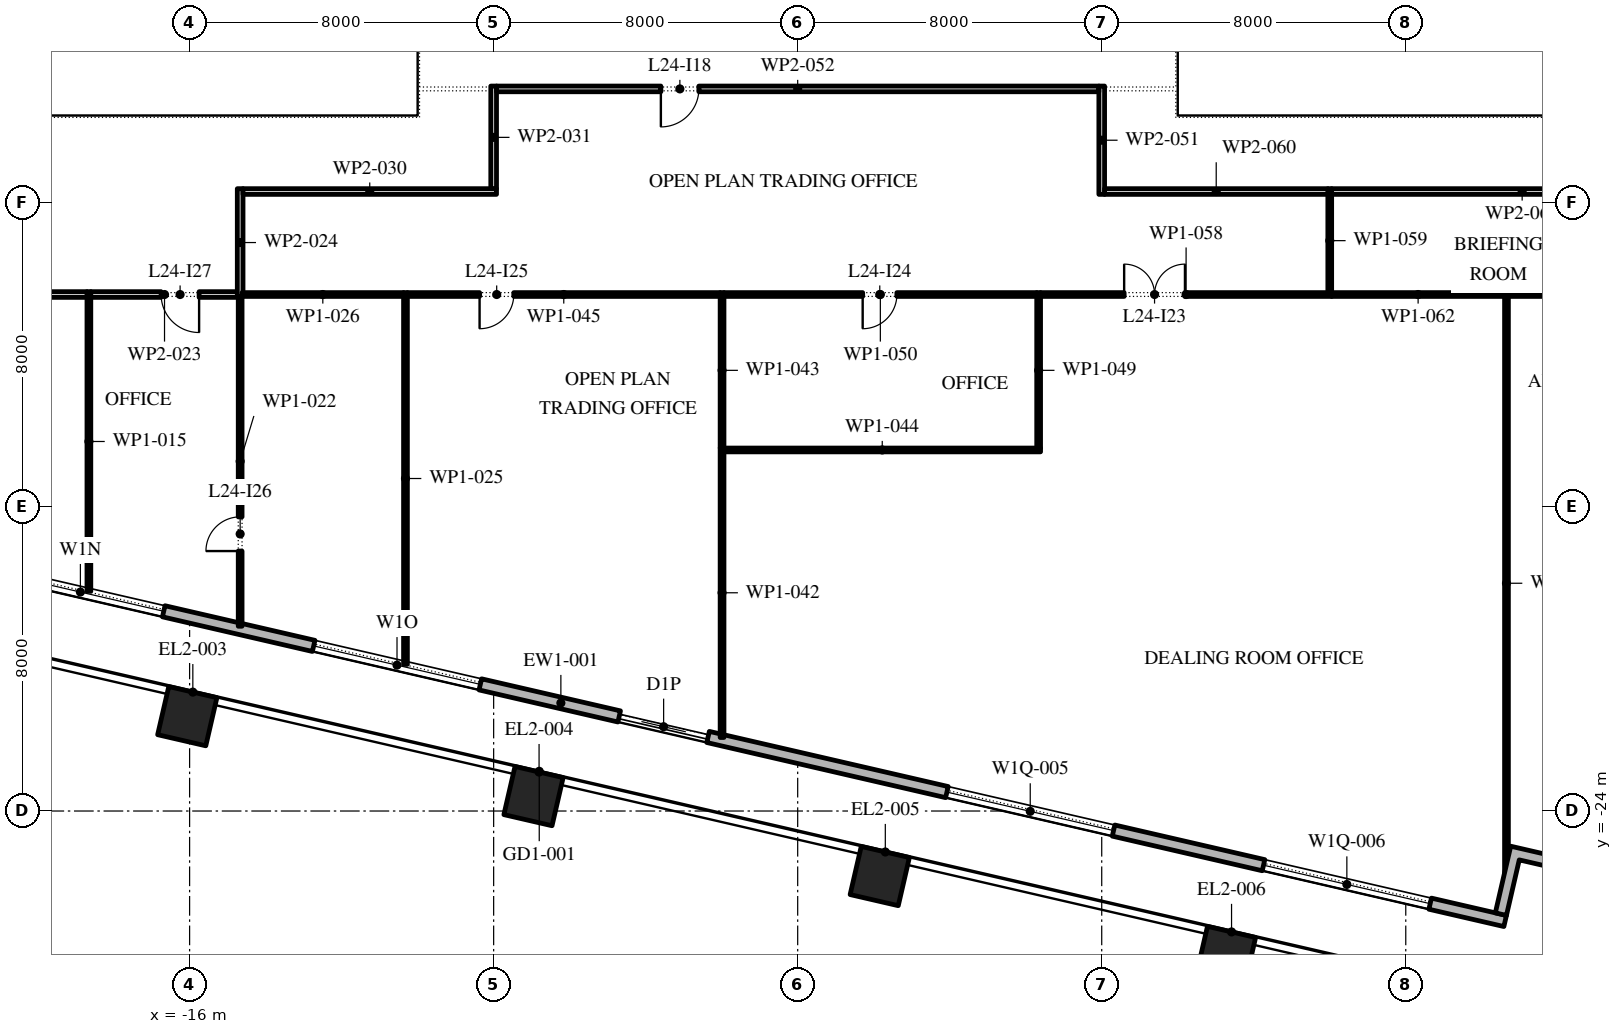
"""IFC4 building model, lengths in metres.
Left out: names, types, materials, properties, quantities, classifications, styles, units other than length and angle.
Written with IfcOpenShell. Run it as: python <this file> out.ifc"""

import sys

from ifc_helpers import new_model, si_unit, direction, frame, frame_2d, origin, origin_2d, place, context, subcontext, project, spatial, polyline, rectangle, outline, extrude, element, fill, save


model = new_model("IFC4")
c1 = context("Model", 3, precision=1e-05, world=origin(), true_north=direction((0.0, 1.0)))
c2 = subcontext(c1, "Body", "Model", "MODEL_VIEW")
j1 = project(units=[si_unit("LENGTHUNIT", "METRE"), si_unit("PLANEANGLEUNIT", "RADIAN")], contexts=[c1])
p1 = place(None, origin())
s1 = spatial("IfcSite", under=j1, at=p1, CompositionType="ELEMENT")
p2 = place(p1, origin())
s2 = spatial("IfcBuilding", under=s1, at=p2, CompositionType="ELEMENT")
p3 = place(p2, frame((0.0, 0.0, 114.0)))
s3 = spatial("IfcBuildingStorey", under=s2, at=p3, CompositionType="ELEMENT", Elevation=114.0)
for number, where, z_axis, x_axis in (
    (1, (-16.061, -21.505, 0.0), (0.0, 0.0, 1.0), (0.974, -0.225, 0.0)),
    (2, (-6.951, -23.608, 0.0), (0.0, 0.0, 1.0), (0.974, -0.225, 0.0)),
    (3, (2.159, -25.711, 0.0), (0.0, 0.0, 1.0), (0.974, -0.225, 0.0)),
    (4, (11.27, -27.815, 0.0), (0.0, 0.0, 1.0), (0.974, -0.225, 0.0)),
):
    element("IfcColumn", number, at=place(p3, frame(where, z_axis=z_axis, x_axis=x_axis)), inside=s3, PredefinedType="COLUMN", context=c2, shape_type="SweptSolid", body=[
        extrude(rectangle(XDim=1.3, YDim=1.3, at=origin_2d()), origin(), (0.0, 0.0, 1.0), 4.2),
    ])
p4 = place(p3, frame((-31.078, -15.421, 0.0), z_axis=(0.0, 0.0, 1.0), x_axis=(0.974370456532, -0.224949357493, 0.0)))
e5 = element("IfcWall", 5, at=p4, inside=s3, PredefinedType="STANDARD", context=c2, shape_type="SweptSolid", body=[
    extrude(rectangle(XDim=51.0, YDim=0.3, at=frame_2d((25.5, 0.0))), origin(), (0.0, 0.0, 1.0), 4.0),
])
p5 = place(p4, frame((1.875, 0.0, 0.45)))
e6 = element("IfcOpeningElement", 6, at=p5, cuts=e5, PredefinedType="OPENING", context=c2, shape_type="SweptSolid", body=[
    extrude(rectangle(XDim=4.5, YDim=2.65, at=frame_2d((2.25, 1.325))), frame((0.0, 0.16, 0.0), z_axis=(0.0, -1.0, 0.0), x_axis=(1.0, 0.0, 0.0)), (0.0, 0.0, 1.0), 0.32),
])
p6 = place(p4, frame((10.275, 0.0, 0.45)))
e7 = element("IfcOpeningElement", 7, at=p6, cuts=e5, PredefinedType="OPENING", context=c2, shape_type="SweptSolid", body=[
    extrude(rectangle(XDim=4.5, YDim=2.525, at=frame_2d((2.25, 1.262))), frame((0.0, 0.16, 0.0), z_axis=(0.0, -1.0, 0.0), x_axis=(1.0, 0.0, 0.0)), (0.0, 0.0, 1.0), 0.32),
])
p7 = place(p4, frame((18.825, 0.0, 0.45)))
e8 = element("IfcOpeningElement", 8, at=p7, cuts=e5, PredefinedType="OPENING", context=c2, shape_type="SweptSolid", body=[
    extrude(rectangle(XDim=4.5, YDim=2.5, at=frame_2d((2.25, 1.25))), frame((0.0, 0.16, 0.0), z_axis=(0.0, -1.0, 0.0), x_axis=(1.0, 0.0, 0.0)), (0.0, 0.0, 1.0), 0.32),
])
p8 = place(p4, frame((27.075, 0.0, 0.0)))
e9 = element("IfcOpeningElement", 9, at=p8, cuts=e5, PredefinedType="OPENING", context=c2, shape_type="SweptSolid", body=[
    extrude(rectangle(XDim=2.4, YDim=2.9, at=frame_2d((1.2, 1.45))), frame((0.0, 0.16, 0.0), z_axis=(0.0, -1.0, 0.0), x_axis=(1.0, 0.0, 0.0)), (0.0, 0.0, 1.0), 0.32),
])
p9 = place(p4, frame((35.925, 0.0, 0.45)))
e10 = element("IfcOpeningElement", 10, at=p9, cuts=e5, PredefinedType="OPENING", context=c2, shape_type="SweptSolid", body=[
    extrude(rectangle(XDim=4.5, YDim=2.45, at=frame_2d((2.25, 1.225))), frame((0.0, 0.16, 0.0), z_axis=(0.0, -1.0, 0.0), x_axis=(1.0, 0.0, 0.0)), (0.0, 0.0, 1.0), 0.32),
])
p10 = place(p4, frame((44.475, 0.0, 0.45)))
e11 = element("IfcOpeningElement", 11, at=p10, cuts=e5, PredefinedType="OPENING", context=c2, shape_type="SweptSolid", body=[
    extrude(rectangle(XDim=4.5, YDim=2.45, at=frame_2d((2.25, 1.225))), frame((0.0, 0.16, 0.0), z_axis=(0.0, -1.0, 0.0), x_axis=(1.0, 0.0, 0.0)), (0.0, 0.0, 1.0), 0.32),
])
p11 = place(p3, origin())
e12 = element("IfcWall", 12, at=p11, inside=s3, PredefinedType="STANDARD", context=c2, shape_type="SweptSolid", body=[
    extrude(outline(polyline([(20.515, -25.331), (20.92, -23.577), (22.967, -24.049), (22.899, -24.342), (21.145, -23.937), (20.74, -25.691), (18.986, -25.286), (18.649, -26.747), (18.357, -26.68), (18.762, -24.926), (20.515, -25.331)])), origin(), (0.0, 0.0, 1.0), 4.0),
])
p12 = place(p3, frame((-18.65, -18.219, 0.0), z_axis=(0.0, 0.0, 1.0), x_axis=(0.0, 1.0, 0.0)))
e13 = element("IfcWall", 13, at=p12, inside=s3, PredefinedType="PARTITIONING", context=c2, shape_type="SweptSolid", body=[
    extrude(rectangle(XDim=7.884, YDim=0.1, at=frame_2d((3.942, 0.0))), origin(), (0.0, 0.0, 1.0), 4.0),
])
p13 = place(p3, frame((-18.7, -10.41, 0.0), z_axis=(0.0, 0.0, 1.0), x_axis=(-1.0, 0.0, 0.0)))
e14 = element("IfcWall", 14, at=p13, inside=s3, PredefinedType="PARTITIONING", context=c2, shape_type="SweptSolid", body=[
    extrude(rectangle(XDim=3.8, YDim=0.15, at=frame_2d((1.9, 0.0))), origin(), (0.0, 0.0, 1.0), 4.0),
])
p14 = place(p13, frame((1.4, 0.0, 0.0)))
e15 = element("IfcOpeningElement", 15, at=p14, cuts=e14, PredefinedType="OPENING", context=c2, shape_type="SweptSolid", body=[
    extrude(rectangle(XDim=1.0, YDim=2.1, at=frame_2d((0.5, 1.05))), frame((0.0, 0.085, 0.0), z_axis=(0.0, -1.0, 0.0), x_axis=(1.0, 0.0, 0.0)), (0.0, 0.0, 1.0), 0.17),
])
p15 = place(p3, frame((-14.67, -19.138, 0.0), z_axis=(0.0, 0.0, 1.0), x_axis=(0.0, 1.0, 0.0)))
e16 = element("IfcWall", 16, at=p15, inside=s3, PredefinedType="PARTITIONING", context=c2, shape_type="SweptSolid", body=[
    extrude(rectangle(XDim=8.678, YDim=0.1, at=frame_2d((4.339, 0.0))), origin(), (0.0, 0.0, 1.0), 4.0),
])
p16 = place(p15, frame((1.978, 0.0, 0.0)))
e17 = element("IfcOpeningElement", 17, at=p16, cuts=e16, PredefinedType="OPENING", context=c2, shape_type="SweptSolid", body=[
    extrude(rectangle(XDim=0.9, YDim=2.1, at=frame_2d((0.45, 1.05))), frame((0.0, 0.06, 0.0), z_axis=(0.0, -1.0, 0.0), x_axis=(1.0, 0.0, 0.0)), (0.0, 0.0, 1.0), 0.12),
])
p17 = place(p3, frame((-14.72, -10.41, 0.0), z_axis=(0.0, 0.0, 1.0), x_axis=(-1.0, 0.0, 0.0)))
e18 = element("IfcWall", 18, at=p17, inside=s3, PredefinedType="PARTITIONING", context=c2, shape_type="SweptSolid", body=[
    extrude(rectangle(XDim=3.88, YDim=0.15, at=frame_2d((1.94, 0.0))), origin(), (0.0, 0.0, 1.0), 4.0),
])
p18 = place(p17, frame((1.03, 0.0, 0.0)))
e19 = element("IfcOpeningElement", 19, at=p18, cuts=e18, PredefinedType="OPENING", context=c2, shape_type="SweptSolid", body=[
    extrude(rectangle(XDim=1.0, YDim=2.1, at=frame_2d((0.5, 1.05))), frame((0.0, 0.085, 0.0), z_axis=(0.0, -1.0, 0.0), x_axis=(1.0, 0.0, 0.0)), (0.0, 0.0, 1.0), 0.17),
])
p19 = place(p3, frame((-14.67, -7.625, 0.0), z_axis=(0.0, 0.0, 1.0), x_axis=(0.0, -1.0, 0.0)))
e20 = element("IfcWall", 20, at=p19, inside=s3, PredefinedType="PARTITIONING", context=c2, shape_type="SweptSolid", body=[
    extrude(rectangle(XDim=2.835, YDim=0.15, at=frame_2d((1.417, 0.0))), origin(), (0.0, 0.0, 1.0), 4.0),
])
p20 = place(p3, frame((-10.32, -20.142, 0.0), z_axis=(0.0, 0.0, 1.0), x_axis=(0.0, 1.0, 0.0)))
e21 = element("IfcWall", 21, at=p20, inside=s3, PredefinedType="PARTITIONING", context=c2, shape_type="SweptSolid", body=[
    extrude(rectangle(XDim=9.782, YDim=0.1, at=frame_2d((4.891, 0.0))), origin(), (0.0, 0.0, 1.0), 4.0),
])
p21 = place(p3, frame((-10.37, -10.41, 0.0), z_axis=(0.0, 0.0, 1.0), x_axis=(-1.0, 0.0, 0.0)))
e22 = element("IfcWall", 22, at=p21, inside=s3, PredefinedType="PARTITIONING", context=c2, shape_type="SweptSolid", body=[
    extrude(rectangle(XDim=4.25, YDim=0.1, at=frame_2d((2.125, 0.0))), origin(), (0.0, 0.0, 1.0), 4.0),
])
p22 = place(p3, frame((-7.925, -7.7, 0.0), z_axis=(0.0, 0.0, 1.0), x_axis=(-1.0, 0.0, 0.0)))
e23 = element("IfcWall", 23, at=p22, inside=s3, PredefinedType="PARTITIONING", context=c2, shape_type="SweptSolid", body=[
    extrude(rectangle(XDim=6.67, YDim=0.15, at=frame_2d((3.335, 0.0))), origin(), (0.0, 0.0, 1.0), 4.0),
])
p23 = place(p3, frame((-8.0, -4.925, 0.0), z_axis=(0.0, 0.0, 1.0), x_axis=(0.0, -1.0, 0.0)))
e24 = element("IfcWall", 24, at=p23, inside=s3, PredefinedType="PARTITIONING", context=c2, shape_type="SweptSolid", body=[
    extrude(rectangle(XDim=2.7, YDim=0.15, at=frame_2d((1.35, 0.0))), origin(), (0.0, 0.0, 1.0), 4.0),
])
p24 = place(p3, frame((-1.99, -22.065, 0.0), z_axis=(0.0, 0.0, 1.0), x_axis=(0.0, 1.0, 0.0)))
e25 = element("IfcWall", 25, at=p24, inside=s3, PredefinedType="PARTITIONING", context=c2, shape_type="SweptSolid", body=[
    extrude(rectangle(XDim=7.615, YDim=0.1, at=frame_2d((3.808, 0.0))), origin(), (0.0, 0.0, 1.0), 4.0),
])
p25 = place(p3, frame((-1.99, -14.45, 0.0), z_axis=(0.0, 0.0, 1.0), x_axis=(0.0, 1.0, 0.0)))
e26 = element("IfcWall", 26, at=p25, inside=s3, PredefinedType="PARTITIONING", context=c2, shape_type="SweptSolid", body=[
    extrude(rectangle(XDim=4.09, YDim=0.1, at=frame_2d((2.045, 0.0))), origin(), (0.0, 0.0, 1.0), 4.0),
])
p26 = place(p3, frame((-1.94, -14.5, 0.0), z_axis=(0.0, 0.0, 1.0), x_axis=(1.0, 0.0, 0.0)))
e27 = element("IfcWall", 27, at=p26, inside=s3, PredefinedType="PARTITIONING", context=c2, shape_type="SweptSolid", body=[
    extrude(rectangle(XDim=8.33, YDim=0.1, at=frame_2d((4.165, 0.0))), origin(), (0.0, 0.0, 1.0), 4.0),
])
p27 = place(p3, frame((-2.04, -10.41, 0.0), z_axis=(0.0, 0.0, 1.0), x_axis=(-1.0, 0.0, 0.0)))
e28 = element("IfcWall", 28, at=p27, inside=s3, PredefinedType="PARTITIONING", context=c2, shape_type="SweptSolid", body=[
    extrude(rectangle(XDim=8.23, YDim=0.1, at=frame_2d((4.115, 0.0))), origin(), (0.0, 0.0, 1.0), 4.0),
])
p28 = place(p27, frame((5.43, 0.0, 0.0)))
e29 = element("IfcOpeningElement", 29, at=p28, cuts=e28, PredefinedType="OPENING", context=c2, shape_type="SweptSolid", body=[
    extrude(rectangle(XDim=0.9, YDim=2.1, at=frame_2d((0.45, 1.05))), frame((0.0, 0.06, 0.0), z_axis=(0.0, -1.0, 0.0), x_axis=(1.0, 0.0, 0.0)), (0.0, 0.0, 1.0), 0.12),
])
p29 = place(p3, frame((6.34, -14.45, 0.0), z_axis=(0.0, 0.0, 1.0), x_axis=(0.0, 1.0, 0.0)))
e30 = element("IfcWall", 30, at=p29, inside=s3, PredefinedType="PARTITIONING", context=c2, shape_type="SweptSolid", body=[
    extrude(rectangle(XDim=4.09, YDim=0.1, at=frame_2d((2.045, 0.0))), origin(), (0.0, 0.0, 1.0), 4.0),
])
p30 = place(p3, frame((6.29, -10.41, 0.0), z_axis=(0.0, 0.0, 1.0), x_axis=(-1.0, 0.0, 0.0)))
e31 = element("IfcWall", 31, at=p30, inside=s3, PredefinedType="PARTITIONING", context=c2, shape_type="SweptSolid", body=[
    extrude(rectangle(XDim=8.23, YDim=0.1, at=frame_2d((4.115, 0.0))), origin(), (0.0, 0.0, 1.0), 4.0),
])
p31 = place(p30, frame((3.68, 0.0, 0.0)))
e32 = element("IfcOpeningElement", 32, at=p31, cuts=e31, PredefinedType="OPENING", context=c2, shape_type="SweptSolid", body=[
    extrude(rectangle(XDim=0.9, YDim=2.1, at=frame_2d((0.45, 1.05))), frame((0.0, 0.06, 0.0), z_axis=(0.0, -1.0, 0.0), x_axis=(1.0, 0.0, 0.0)), (0.0, 0.0, 1.0), 0.12),
])
p32 = place(p3, frame((8.0, -7.775, 0.0), z_axis=(0.0, 0.0, 1.0), x_axis=(0.0, 1.0, 0.0)))
e33 = element("IfcWall", 33, at=p32, inside=s3, PredefinedType="PARTITIONING", context=c2, shape_type="SweptSolid", body=[
    extrude(rectangle(XDim=2.85, YDim=0.15, at=frame_2d((1.425, 0.0))), origin(), (0.0, 0.0, 1.0), 4.0),
])
p33 = place(p3, frame((7.925, -5.0, 0.0), z_axis=(0.0, 0.0, 1.0), x_axis=(-1.0, 0.0, 0.0)))
e34 = element("IfcWall", 34, at=p33, inside=s3, PredefinedType="PARTITIONING", context=c2, shape_type="SweptSolid", body=[
    extrude(rectangle(XDim=15.85, YDim=0.15, at=frame_2d((7.925, 0.0))), origin(), (0.0, 0.0, 1.0), 4.0),
])
p34 = place(p33, frame((10.525, 0.0, 0.0)))
e35 = element("IfcOpeningElement", 35, at=p34, cuts=e34, PredefinedType="OPENING", context=c2, shape_type="SweptSolid", body=[
    extrude(rectangle(XDim=1.0, YDim=2.1, at=frame_2d((0.5, 1.05))), frame((0.0, 0.085, 0.0), z_axis=(0.0, -1.0, 0.0), x_axis=(1.0, 0.0, 0.0)), (0.0, 0.0, 1.0), 0.17),
])
p35 = place(p3, frame((14.05, -10.41, 0.0), z_axis=(0.0, 0.0, 1.0), x_axis=(-1.0, 0.0, 0.0)))
e36 = element("IfcWall", 36, at=p35, inside=s3, PredefinedType="PARTITIONING", context=c2, shape_type="SweptSolid", body=[
    extrude(rectangle(XDim=7.66, YDim=0.1, at=frame_2d((3.83, 0.0))), origin(), (0.0, 0.0, 1.0), 4.0),
])
p36 = place(p35, frame((3.86, 0.0, 0.0)))
e37 = element("IfcOpeningElement", 37, at=p36, cuts=e36, PredefinedType="OPENING", context=c2, shape_type="SweptSolid", body=[
    extrude(rectangle(XDim=1.6, YDim=2.1, at=frame_2d((0.8, 1.05))), frame((0.0, 0.06, 0.0), z_axis=(0.0, -1.0, 0.0), x_axis=(1.0, 0.0, 0.0)), (0.0, 0.0, 1.0), 0.12),
])
p37 = place(p3, frame((14.0, -10.36, 0.0), z_axis=(0.0, 0.0, 1.0), x_axis=(0.0, 1.0, 0.0)))
e38 = element("IfcWall", 38, at=p37, inside=s3, PredefinedType="PARTITIONING", context=c2, shape_type="SweptSolid", body=[
    extrude(rectangle(XDim=2.735, YDim=0.1, at=frame_2d((1.368, 0.0))), origin(), (0.0, 0.0, 1.0), 4.0),
])
p38 = place(p3, frame((13.95, -7.7, 0.0), z_axis=(0.0, 0.0, 1.0), x_axis=(-1.0, 0.0, 0.0)))
e39 = element("IfcWall", 39, at=p38, inside=s3, PredefinedType="PARTITIONING", context=c2, shape_type="SweptSolid", body=[
    extrude(rectangle(XDim=5.875, YDim=0.15, at=frame_2d((2.938, 0.0))), origin(), (0.0, 0.0, 1.0), 4.0),
])
p39 = place(p3, frame((18.65, -25.654, 0.0), z_axis=(0.0, 0.0, 1.0), x_axis=(0.0, 1.0, 0.0)))
e40 = element("IfcWall", 40, at=p39, inside=s3, PredefinedType="PARTITIONING", context=c2, shape_type="SweptSolid", body=[
    extrude(rectangle(XDim=15.294, YDim=0.1, at=frame_2d((7.647, 0.0))), origin(), (0.0, 0.0, 1.0), 4.0),
])
p40 = place(p3, frame((18.6, -10.41, 0.0), z_axis=(0.0, 0.0, 1.0), x_axis=(-1.0, 0.0, 0.0)))
e41 = element("IfcWall", 41, at=p40, inside=s3, PredefinedType="PARTITIONING", context=c2, shape_type="SweptSolid", body=[
    extrude(rectangle(XDim=4.55, YDim=0.1, at=frame_2d((2.275, 0.0))), origin(), (0.0, 0.0, 1.0), 4.0),
])
p41 = place(p3, frame((24.075, -7.7, 0.0), z_axis=(0.0, 0.0, 1.0), x_axis=(-1.0, 0.0, 0.0)))
e42 = element("IfcWall", 42, at=p41, inside=s3, PredefinedType="PARTITIONING", context=c2, shape_type="SweptSolid", body=[
    extrude(rectangle(XDim=10.025, YDim=0.15, at=frame_2d((5.012, 0.0))), origin(), (0.0, 0.0, 1.0), 4.0),
])
p42 = place(p41, frame((2.675, 0.0, 0.0)))
e43 = element("IfcOpeningElement", 43, at=p42, cuts=e42, PredefinedType="OPENING", context=c2, shape_type="SweptSolid", body=[
    extrude(rectangle(XDim=1.0, YDim=2.1, at=frame_2d((0.5, 1.05))), frame((0.0, 0.085, 0.0), z_axis=(0.0, -1.0, 0.0), x_axis=(1.0, 0.0, 0.0)), (0.0, 0.0, 1.0), 0.17),
])
p43 = place(p3, frame((25.05, -10.41, 0.0), z_axis=(0.0, 0.0, 1.0), x_axis=(-1.0, 0.0, 0.0)))
e44 = element("IfcWall", 44, at=p43, inside=s3, PredefinedType="PARTITIONING", context=c2, shape_type="SweptSolid", body=[
    extrude(rectangle(XDim=6.35, YDim=0.1, at=frame_2d((3.175, 0.0))), origin(), (0.0, 0.0, 1.0), 4.0),
])
p44 = place(p43, frame((3.3, 0.0, 0.0)))
e45 = element("IfcOpeningElement", 45, at=p44, cuts=e44, PredefinedType="OPENING", context=c2, shape_type="SweptSolid", body=[
    extrude(rectangle(XDim=0.9, YDim=2.1, at=frame_2d((0.45, 1.05))), frame((0.0, 0.06, 0.0), z_axis=(0.0, -1.0, 0.0), x_axis=(1.0, 0.0, 0.0)), (0.0, 0.0, 1.0), 0.12),
])
p45 = place(p6, origin())
e46 = element("IfcWindow", 46, at=p45, inside=s3, PartitioningType="DOUBLE_PANEL_VERTICAL", PredefinedType="WINDOW", context=c2, shape_type="SweptSolid", body=[
    extrude(rectangle(XDim=4.5, YDim=2.525, at=frame_2d((2.25, 1.262))), frame((0.0, 0.03, 0.0), z_axis=(0.0, -1.0, 0.0), x_axis=(1.0, 0.0, 0.0)), (0.0, 0.0, 1.0), 0.06),
])
fill(e7, e46)
p46 = place(p7, origin())
e47 = element("IfcWindow", 47, at=p46, inside=s3, PartitioningType="DOUBLE_PANEL_VERTICAL", PredefinedType="WINDOW", context=c2, shape_type="SweptSolid", body=[
    extrude(rectangle(XDim=4.5, YDim=2.5, at=frame_2d((2.25, 1.25))), frame((0.0, 0.03, 0.0), z_axis=(0.0, -1.0, 0.0), x_axis=(1.0, 0.0, 0.0)), (0.0, 0.0, 1.0), 0.06),
])
fill(e8, e47)
p47 = place(p8, origin())
e48 = element("IfcDoor", 48, at=p47, inside=s3, OperationType="DOUBLE_DOOR_SLIDING", PredefinedType="DOOR", context=c2, shape_type="SweptSolid", body=[
    extrude(rectangle(XDim=2.4, YDim=2.9, at=frame_2d((1.2, 1.45))), frame((0.0, 0.025, 0.0), z_axis=(0.0, -1.0, 0.0), x_axis=(1.0, 0.0, 0.0)), (0.0, 0.0, 1.0), 0.05),
])
fill(e9, e48)
p48 = place(p9, origin())
e49 = element("IfcWindow", 49, at=p48, inside=s3, PartitioningType="DOUBLE_PANEL_VERTICAL", PredefinedType="WINDOW", context=c2, shape_type="SweptSolid", body=[
    extrude(rectangle(XDim=4.5, YDim=2.45, at=frame_2d((2.25, 1.225))), frame((0.0, 0.03, 0.0), z_axis=(0.0, -1.0, 0.0), x_axis=(1.0, 0.0, 0.0)), (0.0, 0.0, 1.0), 0.06),
])
fill(e10, e49)
p49 = place(p10, origin())
e50 = element("IfcWindow", 50, at=p49, inside=s3, PartitioningType="DOUBLE_PANEL_VERTICAL", PredefinedType="WINDOW", context=c2, shape_type="SweptSolid", body=[
    extrude(rectangle(XDim=4.5, YDim=2.45, at=frame_2d((2.25, 1.225))), frame((0.0, 0.03, 0.0), z_axis=(0.0, -1.0, 0.0), x_axis=(1.0, 0.0, 0.0)), (0.0, 0.0, 1.0), 0.06),
])
fill(e11, e50)
p50 = place(p34, origin())
e51 = element("IfcDoor", 51, at=p50, inside=s3, OperationType="SINGLE_SWING_LEFT", PredefinedType="DOOR", context=c2, shape_type="SweptSolid", body=[
    extrude(rectangle(XDim=1.0, YDim=2.1, at=frame_2d((0.5, 1.05))), frame((0.0, 0.025, 0.0), z_axis=(0.0, -1.0, 0.0), x_axis=(1.0, 0.0, 0.0)), (0.0, 0.0, 1.0), 0.05),
])
fill(e35, e51)
p51 = place(p36, frame((1.6, 0.0, 0.0), z_axis=(0.0, 0.0, 1.0), x_axis=(-1.0, 0.0, 0.0)))
e52 = element("IfcDoor", 52, at=p51, inside=s3, OperationType="SINGLE_SWING_LEFT", PredefinedType="DOOR", context=c2, shape_type="SweptSolid", body=[
    extrude(rectangle(XDim=1.6, YDim=2.1, at=frame_2d((0.8, 1.05))), frame((0.0, 0.025, 0.0), z_axis=(0.0, -1.0, 0.0), x_axis=(1.0, 0.0, 0.0)), (0.0, 0.0, 1.0), 0.05),
])
fill(e37, e52)
p52 = place(p31, origin())
e53 = element("IfcDoor", 53, at=p52, inside=s3, OperationType="SINGLE_SWING_LEFT", PredefinedType="DOOR", context=c2, shape_type="SweptSolid", body=[
    extrude(rectangle(XDim=0.9, YDim=2.1, at=frame_2d((0.45, 1.05))), frame((0.0, 0.025, 0.0), z_axis=(0.0, -1.0, 0.0), x_axis=(1.0, 0.0, 0.0)), (0.0, 0.0, 1.0), 0.05),
])
fill(e32, e53)
p53 = place(p28, origin())
e54 = element("IfcDoor", 54, at=p53, inside=s3, OperationType="SINGLE_SWING_LEFT", PredefinedType="DOOR", context=c2, shape_type="SweptSolid", body=[
    extrude(rectangle(XDim=0.9, YDim=2.1, at=frame_2d((0.45, 1.05))), frame((0.0, 0.025, 0.0), z_axis=(0.0, -1.0, 0.0), x_axis=(1.0, 0.0, 0.0)), (0.0, 0.0, 1.0), 0.05),
])
fill(e29, e54)
p54 = place(p16, origin())
e55 = element("IfcDoor", 55, at=p54, inside=s3, OperationType="SINGLE_SWING_RIGHT", PredefinedType="DOOR", context=c2, shape_type="SweptSolid", body=[
    extrude(rectangle(XDim=0.9, YDim=2.1, at=frame_2d((0.45, 1.05))), frame((0.0, 0.025, 0.0), z_axis=(0.0, -1.0, 0.0), x_axis=(1.0, 0.0, 0.0)), (0.0, 0.0, 1.0), 0.05),
])
fill(e17, e55)
p55 = place(p18, origin())
e56 = element("IfcDoor", 56, at=p55, inside=s3, OperationType="SINGLE_SWING_RIGHT", PredefinedType="DOOR", context=c2, shape_type="SweptSolid", body=[
    extrude(rectangle(XDim=1.0, YDim=2.1, at=frame_2d((0.5, 1.05))), frame((0.0, 0.025, 0.0), z_axis=(0.0, -1.0, 0.0), x_axis=(1.0, 0.0, 0.0)), (0.0, 0.0, 1.0), 0.05),
])
fill(e19, e56)
save(model, sys.argv[1])
